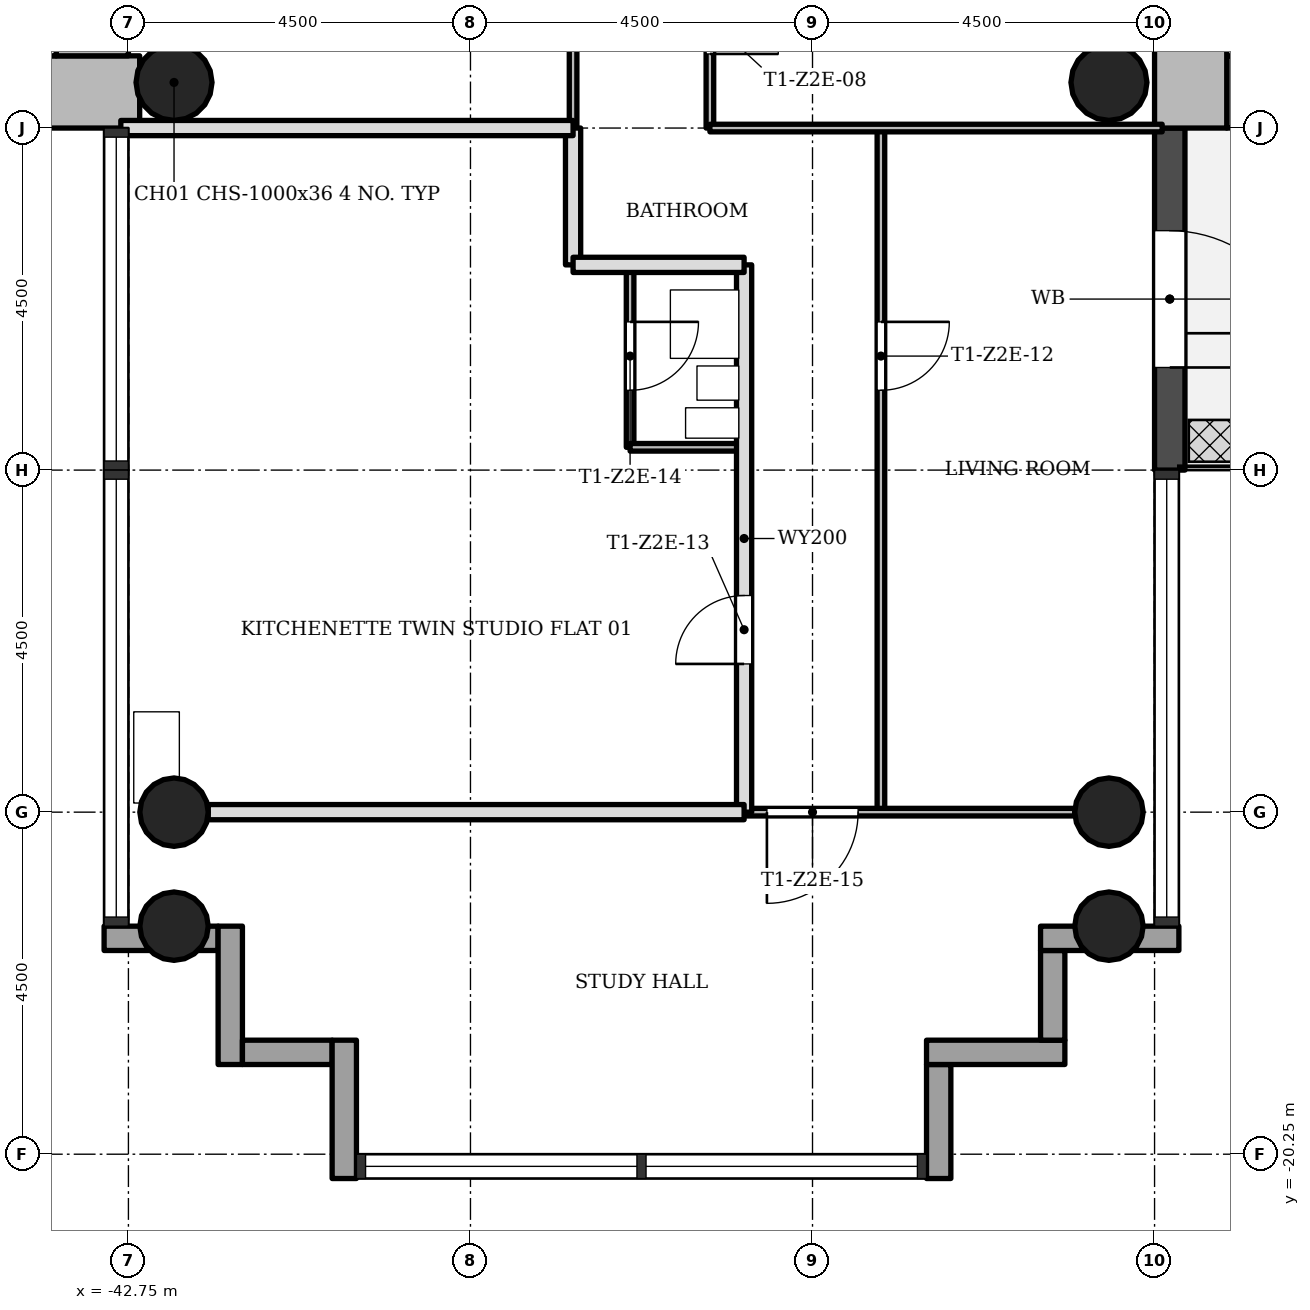
"""IFC4 building model, lengths in metres.
Left out: names, types, materials, properties, quantities, classifications, styles, units other than length and angle.
Written with IfcOpenShell. Run it as: python <this file> out.ifc"""

import sys

from ifc_helpers import new_model, si_unit, direction, frame, frame_2d, origin, origin_2d, place, context, subcontext, project, spatial, rectangle, hollow_circle, extrude, element, fill, save


model = new_model("IFC4")
c1 = context("Model", 3, precision=1e-05, world=origin(), true_north=direction((0.0, 1.0)))
c2 = subcontext(c1, "Body", "Model", "MODEL_VIEW")
j1 = project(units=[si_unit("LENGTHUNIT", "METRE"), si_unit("PLANEANGLEUNIT", "RADIAN")], contexts=[c1])
p1 = place(None, origin())
s1 = spatial("IfcSite", under=j1, at=p1, CompositionType="ELEMENT")
p2 = place(p1, origin())
s2 = spatial("IfcBuilding", under=s1, at=p2, CompositionType="ELEMENT")
p3 = place(p2, frame((0.0, 0.0, 103.8)))
s3 = spatial("IfcBuildingStorey", under=s2, at=p3, CompositionType="ELEMENT", Elevation=103.8)
p4 = place(p3, frame((-28.3, -6.275, 0.0), z_axis=(0.0, 0.0, 1.0), x_axis=(1.0, 0.0, 0.0)))
e1 = element("IfcWall", 1, at=p4, inside=s3, PredefinedType="SHEAR", context=c2, shape_type="SweptSolid", body=[
    extrude(rectangle(XDim=8.05, YDim=0.95, at=frame_2d((4.025, 0.0))), origin(), (0.0, 0.0, 1.0), 3.4),
])
p5 = place(p3, frame((-28.775, 5.8, 0.0), z_axis=(0.0, 0.0, 1.0), x_axis=(0.0, -1.0, 0.0)))
e2 = element("IfcWall", 2, at=p5, inside=s3, PredefinedType="SHEAR", context=c2, shape_type="SweptSolid", body=[
    extrude(rectangle(XDim=12.55, YDim=0.95, at=frame_2d((6.275, 0.0))), origin(), (0.0, 0.0, 1.0), 3.4),
])
p6 = place(p5, frame((4.9, 0.0, 0.0)))
e3 = element("IfcOpeningElement", 3, at=p6, cuts=e2, PredefinedType="OPENING", context=c2, shape_type="SweptSolid", body=[
    extrude(rectangle(XDim=1.8, YDim=2.1, at=frame_2d((0.9, 1.05))), frame((0.0, 0.485, 0.0), z_axis=(0.0, -1.0, 0.0), x_axis=(1.0, 0.0, 0.0)), (0.0, 0.0, 1.0), 0.97),
])
p7 = place(p3, frame((-51.298, -6.275, 0.0), z_axis=(0.0, 0.0, 1.0), x_axis=(1.0, 0.0, 0.0)))
e4 = element("IfcWall", 4, at=p7, inside=s3, PredefinedType="SHEAR", context=c2, shape_type="SweptSolid", body=[
    extrude(rectangle(XDim=8.696, YDim=0.95, at=frame_2d((4.348, 0.0))), origin(), (0.0, 0.0, 1.0), 3.4),
])
p8 = place(p3, frame((-43.225, -5.8, 0.0), z_axis=(0.0, 0.0, 1.0), x_axis=(0.0, 1.0, 0.0)))
e5 = element("IfcWall", 5, at=p8, inside=s3, PredefinedType="SHEAR", context=c2, shape_type="SweptSolid", body=[
    extrude(rectangle(XDim=12.55, YDim=0.95, at=frame_2d((6.275, 0.0))), origin(), (0.0, 0.0, 1.0), 3.4),
])
p9 = place(p8, frame((4.9, 0.0, 0.0)))
e6 = element("IfcOpeningElement", 6, at=p9, cuts=e5, PredefinedType="OPENING", context=c2, shape_type="SweptSolid", body=[
    extrude(rectangle(XDim=1.8, YDim=2.1, at=frame_2d((0.9, 1.05))), frame((0.0, 0.485, 0.0), z_axis=(0.0, -1.0, 0.0), x_axis=(1.0, 0.0, 0.0)), (0.0, 0.0, 1.0), 0.97),
])
for number, where, z_axis, x_axis in (
    (7, (-42.15, -15.75, 0.0), (0.0, 0.0, 1.0), (1.0, 0.0, 0.0)),
    (8, (-29.85, -15.75, 0.0), (0.0, 0.0, 1.0), (1.0, 0.0, 0.0)),
    (9, (-42.15, -17.25, 0.0), (0.0, 0.0, 1.0), (1.0, 0.0, 0.0)),
    (10, (-29.85, -17.25, 0.0), (0.0, 0.0, 1.0), (1.0, 0.0, 0.0)),
):
    element("IfcColumn", number, at=place(p3, frame(where, z_axis=z_axis, x_axis=x_axis)), inside=s3, PredefinedType="COLUMN", context=c2, shape_type="SweptSolid", body=[
        extrude(hollow_circle(Radius=0.45, WallThickness=0.032, at=origin_2d()), origin(), (0.0, 0.0, 1.0), 3.4),
    ])
for number, where, z_axis, x_axis in (
    (11, (-42.15, -6.15, 0.0), (0.0, 0.0, 1.0), (1.0, 0.0, 0.0)),
    (12, (-29.85, -6.15, 0.0), (0.0, 0.0, 1.0), (1.0, 0.0, 0.0)),
):
    element("IfcColumn", number, at=place(p3, frame(where, z_axis=z_axis, x_axis=x_axis)), inside=s3, PredefinedType="COLUMN", context=c2, shape_type="SweptSolid", body=[
        extrude(hollow_circle(Radius=0.5, WallThickness=0.036, at=origin_2d()), origin(), (0.0, 0.0, 1.0), 3.4),
    ])
p10 = place(p3, frame((-43.07, -17.41, -0.3), z_axis=(0.0, 0.0, 1.0), x_axis=(1.0, 0.0, 0.0)))
e13 = element("IfcWall", 13, at=p10, inside=s3, PredefinedType="STANDARD", context=c2, shape_type="SweptSolid", body=[
    extrude(rectangle(XDim=1.5, YDim=0.32, at=frame_2d((0.75, 0.0))), origin(), (0.0, 0.0, 1.0), 3.4),
])
p11 = place(p3, frame((-41.41, -17.25, -0.3), z_axis=(0.0, 0.0, 1.0), x_axis=(0.0, -1.0, 0.0)))
e14 = element("IfcWall", 14, at=p11, inside=s3, PredefinedType="STANDARD", context=c2, shape_type="SweptSolid", body=[
    extrude(rectangle(XDim=1.82, YDim=0.32, at=frame_2d((0.91, 0.0))), origin(), (0.0, 0.0, 1.0), 3.4),
])
p12 = place(p3, frame((-41.25, -18.91, -0.3), z_axis=(0.0, 0.0, 1.0), x_axis=(1.0, 0.0, 0.0)))
e15 = element("IfcWall", 15, at=p12, inside=s3, PredefinedType="STANDARD", context=c2, shape_type="SweptSolid", body=[
    extrude(rectangle(XDim=1.18, YDim=0.32, at=frame_2d((0.59, 0.0))), origin(), (0.0, 0.0, 1.0), 3.4),
])
p13 = place(p3, frame((-39.91, -18.75, -0.3), z_axis=(0.0, 0.0, 1.0), x_axis=(0.0, -1.0, 0.0)))
e16 = element("IfcWall", 16, at=p13, inside=s3, PredefinedType="STANDARD", context=c2, shape_type="SweptSolid", body=[
    extrude(rectangle(XDim=1.82, YDim=0.32, at=frame_2d((0.91, 0.0))), origin(), (0.0, 0.0, 1.0), 3.4),
])
p14 = place(p3, frame((-32.09, -20.57, -0.3), z_axis=(0.0, 0.0, 1.0), x_axis=(0.0, 1.0, 0.0)))
e17 = element("IfcWall", 17, at=p14, inside=s3, PredefinedType="STANDARD", context=c2, shape_type="SweptSolid", body=[
    extrude(rectangle(XDim=1.5, YDim=0.32, at=frame_2d((0.75, 0.0))), origin(), (0.0, 0.0, 1.0), 3.4),
])
p15 = place(p3, frame((-32.25, -18.91, -0.3), z_axis=(0.0, 0.0, 1.0), x_axis=(1.0, 0.0, 0.0)))
e18 = element("IfcWall", 18, at=p15, inside=s3, PredefinedType="STANDARD", context=c2, shape_type="SweptSolid", body=[
    extrude(rectangle(XDim=1.82, YDim=0.32, at=frame_2d((0.91, 0.0))), origin(), (0.0, 0.0, 1.0), 3.4),
])
p16 = place(p3, frame((-30.59, -18.75, -0.3), z_axis=(0.0, 0.0, 1.0), x_axis=(0.0, 1.0, 0.0)))
e19 = element("IfcWall", 19, at=p16, inside=s3, PredefinedType="STANDARD", context=c2, shape_type="SweptSolid", body=[
    extrude(rectangle(XDim=1.18, YDim=0.32, at=frame_2d((0.59, 0.0))), origin(), (0.0, 0.0, 1.0), 3.4),
])
p17 = place(p3, frame((-30.75, -17.41, -0.3), z_axis=(0.0, 0.0, 1.0), x_axis=(1.0, 0.0, 0.0)))
e20 = element("IfcWall", 20, at=p17, inside=s3, PredefinedType="STANDARD", context=c2, shape_type="SweptSolid", body=[
    extrude(rectangle(XDim=1.82, YDim=0.32, at=frame_2d((0.91, 0.0))), origin(), (0.0, 0.0, 1.0), 3.4),
])
p18 = place(p3, frame((-29.05, -11.25, -0.02), z_axis=(0.0, 0.0, 1.0), x_axis=(0.0, 1.0, 0.0)))
e21 = element("IfcWall", 21, at=p18, inside=s3, PredefinedType="STANDARD", context=c2, shape_type="SweptSolid", body=[
    extrude(rectangle(XDim=4.5, YDim=0.4, at=frame_2d((2.25, 0.0))), origin(), (0.0, 0.0, 1.0), 3.12),
])
p19 = place(p18, frame((1.35, 0.0, 0.02)))
e22 = element("IfcOpeningElement", 22, at=p19, cuts=e21, PredefinedType="OPENING", context=c2, shape_type="SweptSolid", body=[
    extrude(rectangle(XDim=1.8, YDim=2.1, at=frame_2d((0.9, 1.05))), frame((0.0, 0.21, 0.0), z_axis=(0.0, -1.0, 0.0), x_axis=(1.0, 0.0, 0.0)), (0.0, 0.0, 1.0), 0.42),
])
p20 = place(p3, frame((-36.9, -6.75, 0.0), z_axis=(0.0, 0.0, 1.0), x_axis=(0.0, 1.0, 0.0)))
e23 = element("IfcWall", 23, at=p20, inside=s3, PredefinedType="PARTITIONING", context=c2, shape_type="SweptSolid", body=[
    extrude(rectangle(XDim=5.25, YDim=0.1, at=frame_2d((2.625, 0.0))), origin(), (0.0, 0.0, 1.0), 3.0),
])
p21 = place(p3, frame((-36.9, -8.55, 0.0), z_axis=(0.0, 0.0, 1.0), x_axis=(0.0, 1.0, 0.0)))
e24 = element("IfcWall", 24, at=p21, inside=s3, PredefinedType="SOLIDWALL", context=c2, shape_type="SweptSolid", body=[
    extrude(rectangle(XDim=1.8, YDim=0.2, at=frame_2d((0.9, 0.0))), origin(), (0.0, 0.0, 1.0), 3.0),
])
p22 = place(p3, frame((-36.15, -10.95, 0.0), z_axis=(0.0, 0.0, 1.0), x_axis=(0.0, 1.0, 0.0)))
e25 = element("IfcWall", 25, at=p22, inside=s3, PredefinedType="PARTITIONING", context=c2, shape_type="SweptSolid", body=[
    extrude(rectangle(XDim=2.4, YDim=0.1, at=frame_2d((1.2, 0.0))), origin(), (0.0, 0.0, 1.0), 3.0),
])
p23 = place(p22, frame((0.75, 0.0, 0.0)))
e26 = element("IfcOpeningElement", 26, at=p23, cuts=e25, PredefinedType="OPENING", context=c2, shape_type="SweptSolid", body=[
    extrude(rectangle(XDim=0.9, YDim=2.1, at=frame_2d((0.45, 1.05))), frame((0.0, 0.06, 0.0), z_axis=(0.0, -1.0, 0.0), x_axis=(1.0, 0.0, 0.0)), (0.0, 0.0, 1.0), 0.12),
])
p24 = place(p3, frame((-35.1, -6.75, 0.0), z_axis=(0.0, 0.0, 1.0), x_axis=(0.0, 1.0, 0.0)))
e27 = element("IfcWall", 27, at=p24, inside=s3, PredefinedType="PARTITIONING", context=c2, shape_type="SweptSolid", body=[
    extrude(rectangle(XDim=5.25, YDim=0.1, at=frame_2d((2.625, 0.0))), origin(), (0.0, 0.0, 1.0), 3.0),
])
p25 = place(p24, frame((3.6, 0.0, 0.0)))
e28 = element("IfcOpeningElement", 28, at=p25, cuts=e27, PredefinedType="OPENING", context=c2, shape_type="SweptSolid", body=[
    extrude(rectangle(XDim=0.9, YDim=2.1, at=frame_2d((0.45, 1.05))), frame((0.0, 0.06, 0.0), z_axis=(0.0, -1.0, 0.0), x_axis=(1.0, 0.0, 0.0)), (0.0, 0.0, 1.0), 0.12),
])
p26 = place(p24, frame((0.975, 0.0, 0.0)))
e29 = element("IfcOpeningElement", 29, at=p26, cuts=e27, PredefinedType="OPENING", context=c2, shape_type="SweptSolid", body=[
    extrude(rectangle(XDim=0.9, YDim=2.1, at=frame_2d((0.45, 1.05))), frame((0.0, 0.06, 0.0), z_axis=(0.0, -1.0, 0.0), x_axis=(1.0, 0.0, 0.0)), (0.0, 0.0, 1.0), 0.12),
])
p27 = place(p3, frame((-34.65, -15.75, 0.0), z_axis=(0.0, 0.0, 1.0), x_axis=(0.0, 1.0, 0.0)))
e30 = element("IfcWall", 30, at=p27, inside=s3, PredefinedType="SOLIDWALL", context=c2, shape_type="SweptSolid", body=[
    extrude(rectangle(XDim=7.2, YDim=0.2, at=frame_2d((3.6, 0.0))), origin(), (0.0, 0.0, 1.0), 3.0),
])
p28 = place(p27, frame((1.95, 0.0, 0.0)))
e31 = element("IfcOpeningElement", 31, at=p28, cuts=e30, PredefinedType="OPENING", context=c2, shape_type="SweptSolid", body=[
    extrude(rectangle(XDim=0.9, YDim=2.1, at=frame_2d((0.45, 1.05))), frame((0.0, 0.11, 0.0), z_axis=(0.0, -1.0, 0.0), x_axis=(1.0, 0.0, 0.0)), (0.0, 0.0, 1.0), 0.22),
])
p29 = place(p3, frame((-32.85, -15.75, 0.0), z_axis=(0.0, 0.0, 1.0), x_axis=(0.0, 1.0, 0.0)))
e32 = element("IfcWall", 32, at=p29, inside=s3, PredefinedType="PARTITIONING", context=c2, shape_type="SweptSolid", body=[
    extrude(rectangle(XDim=9.0, YDim=0.1, at=frame_2d((4.5, 0.0))), origin(), (0.0, 0.0, 1.0), 3.0),
])
p30 = place(p29, frame((5.55, 0.0, 0.0)))
e33 = element("IfcOpeningElement", 33, at=p30, cuts=e32, PredefinedType="OPENING", context=c2, shape_type="SweptSolid", body=[
    extrude(rectangle(XDim=0.9, YDim=2.1, at=frame_2d((0.45, 1.05))), frame((0.0, 0.06, 0.0), z_axis=(0.0, -1.0, 0.0), x_axis=(1.0, 0.0, 0.0)), (0.0, 0.0, 1.0), 0.12),
])
p31 = place(p3, frame((-34.65, -15.75, 0.0), z_axis=(0.0, 0.0, 1.0), x_axis=(1.0, 0.0, 0.0)))
e34 = element("IfcWall", 34, at=p31, inside=s3, PredefinedType="PARTITIONING", context=c2, shape_type="SweptSolid", body=[
    extrude(rectangle(XDim=4.35, YDim=0.1, at=frame_2d((2.175, 0.0))), origin(), (0.0, 0.0, 1.0), 3.0),
])
p32 = place(p31, frame((0.3, 0.0, 0.0)))
e35 = element("IfcOpeningElement", 35, at=p32, cuts=e34, PredefinedType="OPENING", context=c2, shape_type="SweptSolid", body=[
    extrude(rectangle(XDim=1.2, YDim=2.1, at=frame_2d((0.6, 1.05))), frame((0.0, 0.06, 0.0), z_axis=(0.0, -1.0, 0.0), x_axis=(1.0, 0.0, 0.0)), (0.0, 0.0, 1.0), 0.12),
])
p33 = place(p3, frame((-41.7, -15.75, 0.0), z_axis=(0.0, 0.0, 1.0), x_axis=(1.0, 0.0, 0.0)))
e36 = element("IfcWall", 36, at=p33, inside=s3, PredefinedType="SOLIDWALL", context=c2, shape_type="SweptSolid", body=[
    extrude(rectangle(XDim=7.05, YDim=0.2, at=frame_2d((3.525, 0.0))), origin(), (0.0, 0.0, 1.0), 3.0),
])
p34 = place(p3, frame((-36.15, -10.95, 0.0), z_axis=(0.0, 0.0, 1.0), x_axis=(1.0, 0.0, 0.0)))
e37 = element("IfcWall", 37, at=p34, inside=s3, PredefinedType="PARTITIONING", context=c2, shape_type="SweptSolid", body=[
    extrude(rectangle(XDim=1.5, YDim=0.1, at=frame_2d((0.75, 0.0))), origin(), (0.0, 0.0, 1.0), 3.0),
])
p35 = place(p3, frame((-36.9, -8.55, 0.0), z_axis=(0.0, 0.0, 1.0), x_axis=(1.0, 0.0, 0.0)))
e38 = element("IfcWall", 38, at=p35, inside=s3, PredefinedType="SOLIDWALL", context=c2, shape_type="SweptSolid", body=[
    extrude(rectangle(XDim=2.25, YDim=0.2, at=frame_2d((1.125, 0.0))), origin(), (0.0, 0.0, 1.0), 3.0),
])
p36 = place(p3, frame((-35.1, -6.75, 0.0), z_axis=(0.0, 0.0, 1.0), x_axis=(1.0, 0.0, 0.0)))
e39 = element("IfcWall", 39, at=p36, inside=s3, PredefinedType="PARTITIONING", context=c2, shape_type="SweptSolid", body=[
    extrude(rectangle(XDim=5.95, YDim=0.1, at=frame_2d((2.975, 0.0))), origin(), (0.0, 0.0, 1.0), 3.0),
])
p37 = place(p3, frame((-42.85, -6.75, 0.0), z_axis=(0.0, 0.0, 1.0), x_axis=(1.0, 0.0, 0.0)))
e40 = element("IfcWall", 40, at=p37, inside=s3, PredefinedType="SOLIDWALL", context=c2, shape_type="SweptSolid", body=[
    extrude(rectangle(XDim=5.95, YDim=0.2, at=frame_2d((2.975, 0.0))), origin(), (0.0, 0.0, 1.0), 3.0),
])
p38 = place(p3, frame((-43.825, -1.9, 0.0), z_axis=(0.0, 0.0, 1.0), x_axis=(0.0, -1.0, 0.0)))
e41 = element("IfcWall", 41, at=p38, inside=s3, PredefinedType="SHEAR", context=c2, shape_type="SweptSolid", body=[
    extrude(rectangle(XDim=3.9, YDim=0.25, at=frame_2d((1.95, 0.0))), origin(), (0.0, 0.0, 1.0), 3.4),
])
p39 = place(p19, origin())
e42 = element("IfcDoor", 42, at=p39, inside=s3, OperationType="SINGLE_SWING_LEFT", PredefinedType="DOOR", context=c2, shape_type="SweptSolid", body=[
    extrude(rectangle(XDim=1.8, YDim=2.1, at=frame_2d((0.9, 1.05))), frame((0.0, 0.025, 0.0), z_axis=(0.0, -1.0, 0.0), x_axis=(1.0, 0.0, 0.0)), (0.0, 0.0, 1.0), 0.05),
])
fill(e22, e42)
p40 = place(p26, origin())
e43 = element("IfcDoor", 43, at=p40, inside=s3, OperationType="SINGLE_SWING_LEFT", PredefinedType="DOOR", context=c2, shape_type="SweptSolid", body=[
    extrude(rectangle(XDim=0.9, YDim=2.1, at=frame_2d((0.45, 1.05))), frame((0.0, 0.025, 0.0), z_axis=(0.0, -1.0, 0.0), x_axis=(1.0, 0.0, 0.0)), (0.0, 0.0, 1.0), 0.05),
])
fill(e29, e43)
p41 = place(p30, origin())
e44 = element("IfcDoor", 44, at=p41, inside=s3, OperationType="SINGLE_SWING_RIGHT", PredefinedType="DOOR", context=c2, shape_type="SweptSolid", body=[
    extrude(rectangle(XDim=0.9, YDim=2.1, at=frame_2d((0.45, 1.05))), frame((0.0, 0.025, 0.0), z_axis=(0.0, -1.0, 0.0), x_axis=(1.0, 0.0, 0.0)), (0.0, 0.0, 1.0), 0.05),
])
fill(e33, e44)
p42 = place(p28, origin())
e45 = element("IfcDoor", 45, at=p42, inside=s3, OperationType="SINGLE_SWING_RIGHT", PredefinedType="DOOR", context=c2, shape_type="SweptSolid", body=[
    extrude(rectangle(XDim=0.9, YDim=2.1, at=frame_2d((0.45, 1.05))), frame((0.0, 0.025, 0.0), z_axis=(0.0, -1.0, 0.0), x_axis=(1.0, 0.0, 0.0)), (0.0, 0.0, 1.0), 0.05),
])
fill(e31, e45)
p43 = place(p23, origin())
e46 = element("IfcDoor", 46, at=p43, inside=s3, OperationType="SINGLE_SWING_RIGHT", PredefinedType="DOOR", context=c2, shape_type="SweptSolid", body=[
    extrude(rectangle(XDim=0.9, YDim=2.1, at=frame_2d((0.45, 1.05))), frame((0.0, 0.025, 0.0), z_axis=(0.0, -1.0, 0.0), x_axis=(1.0, 0.0, 0.0)), (0.0, 0.0, 1.0), 0.05),
])
fill(e26, e46)
p44 = place(p32, origin())
e47 = element("IfcDoor", 47, at=p44, inside=s3, OperationType="SINGLE_SWING_LEFT", PredefinedType="DOOR", context=c2, shape_type="SweptSolid", body=[
    extrude(rectangle(XDim=1.2, YDim=2.1, at=frame_2d((0.6, 1.05))), frame((0.0, 0.025, 0.0), z_axis=(0.0, -1.0, 0.0), x_axis=(1.0, 0.0, 0.0)), (0.0, 0.0, 1.0), 0.05),
])
fill(e35, e47)
save(model, sys.argv[1])
